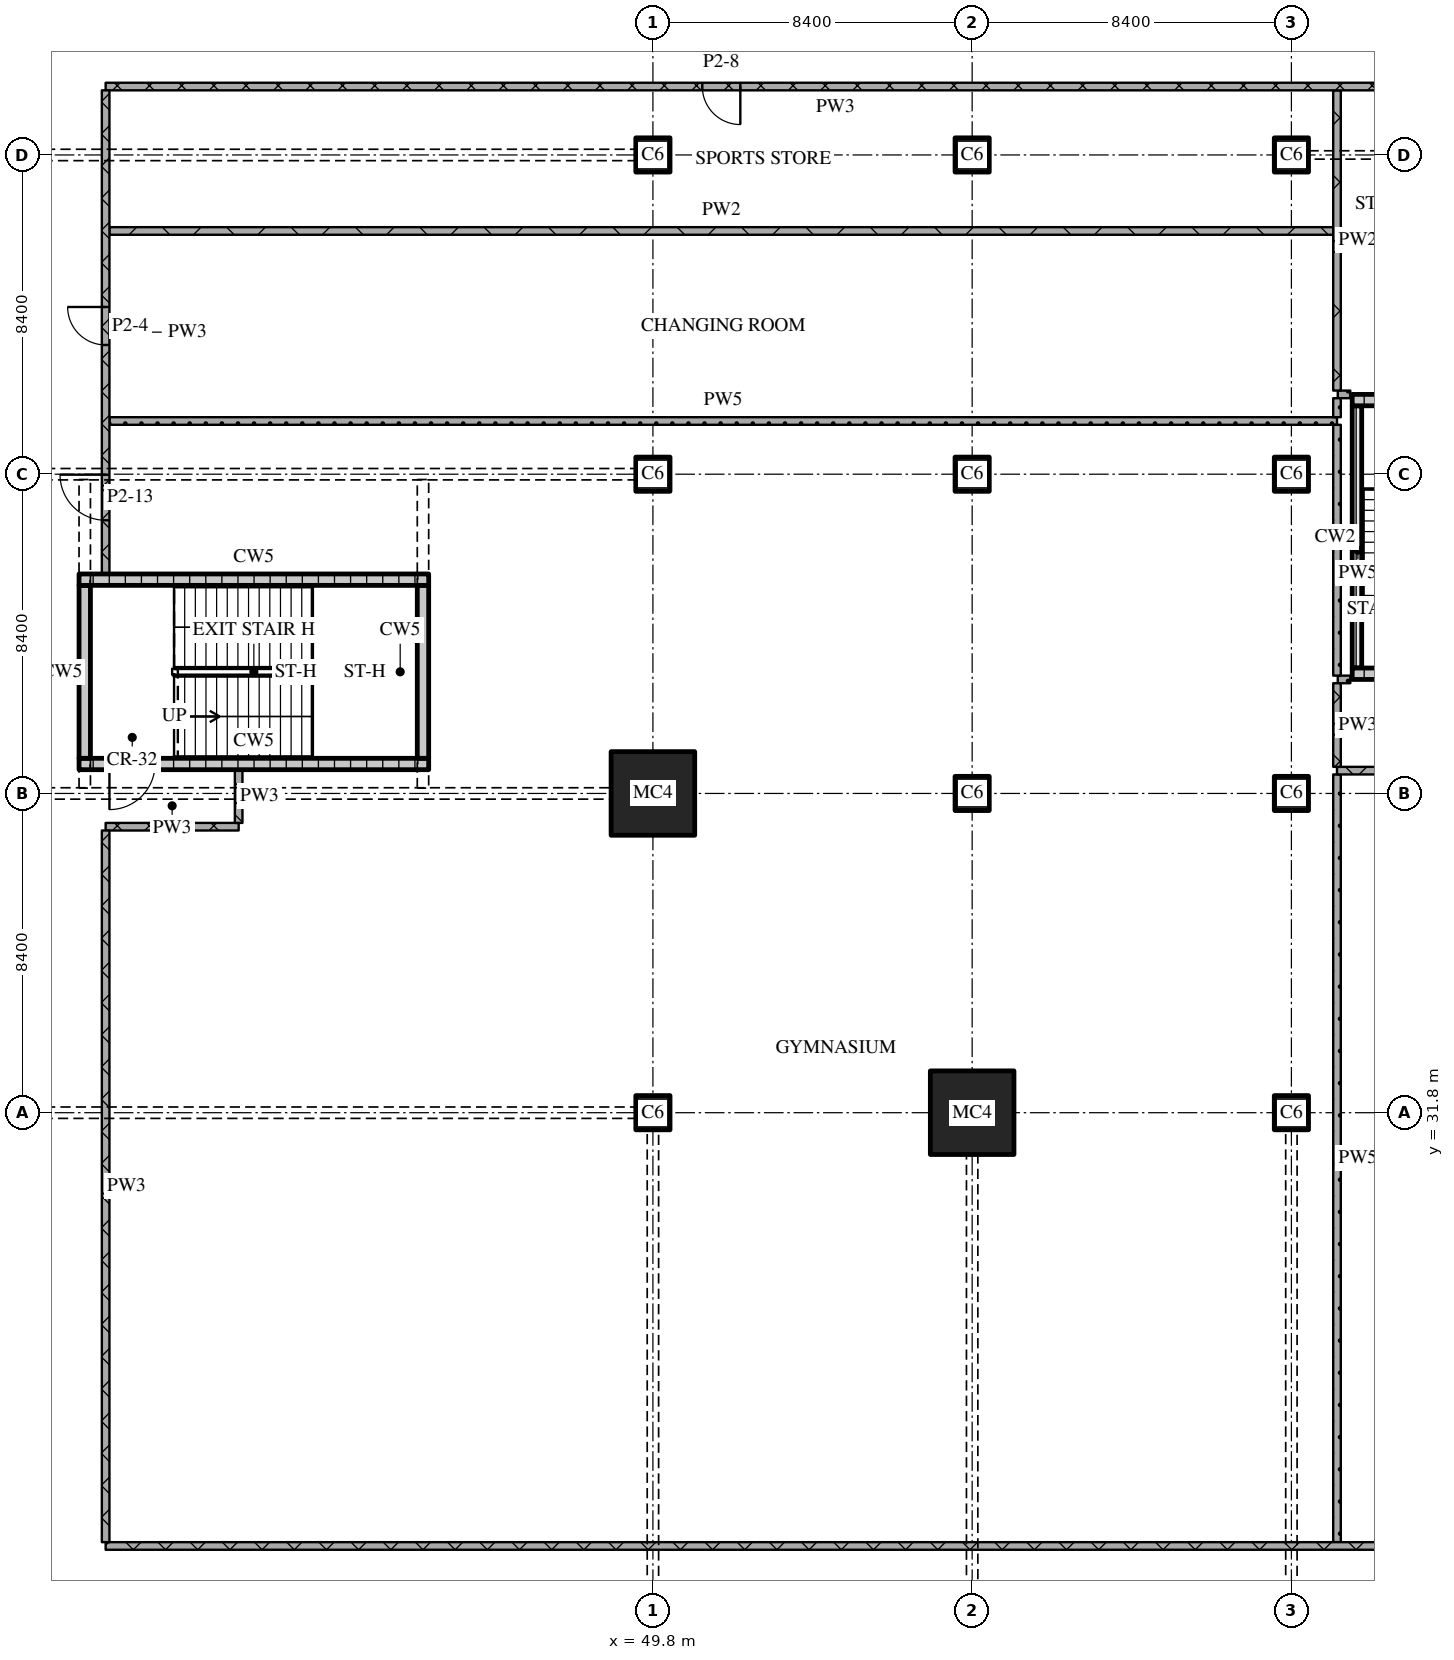
"""IFC4 building model, lengths in metres.
Left out: names, types, materials, properties, quantities, classifications, styles, units other than length and angle.
Written with IfcOpenShell. Run it as: python <this file> out.ifc"""

import sys

from ifc_helpers import new_model, si_unit, direction, frame, frame_2d, origin, origin_2d, place, context, subcontext, project, spatial, rectangle, extrude, element, fill, save


model = new_model("IFC4")
c1 = context("Model", 3, precision=1e-05, world=origin(), true_north=direction((0.0, 1.0)))
c2 = subcontext(c1, "Body", "Model", "MODEL_VIEW")
j1 = project(units=[si_unit("LENGTHUNIT", "METRE"), si_unit("PLANEANGLEUNIT", "RADIAN")], contexts=[c1])
p1 = place(None, origin())
s1 = spatial("IfcSite", under=j1, at=p1, CompositionType="ELEMENT")
p2 = place(p1, origin())
s2 = spatial("IfcBuilding", under=s1, at=p2, CompositionType="ELEMENT")
p3 = place(p2, frame((0.0, 0.0, 14.4)))
s3 = spatial("IfcBuildingStorey", under=s2, at=p3, CompositionType="ELEMENT", Elevation=14.4)
p4 = place(p3, frame((49.8, 31.8, 0.0), z_axis=(0.0, 0.0, 1.0), x_axis=(1.0, 0.0, 0.0)))
e1 = element("IfcColumn", 1, at=p4, inside=s3, PredefinedType="COLUMN", context=c2, shape_type="SweptSolid", body=[
    extrude(rectangle(XDim=0.9, YDim=0.9, at=origin_2d()), origin(), (0.0, 0.0, 1.0), 4.8),
])
p5 = place(p3, frame((49.8, 40.2, 0.0), z_axis=(0.0, 0.0, 1.0), x_axis=(1.0, 0.0, 0.0)))
e2 = element("IfcColumn", 2, at=p5, inside=s3, PredefinedType="COLUMN", context=c2, shape_type="SweptSolid", body=[
    extrude(rectangle(XDim=2.2, YDim=2.2, at=origin_2d()), origin(), (0.0, 0.0, 1.0), 4.8),
])
for number, where, z_axis, x_axis in (
    (3, (49.8, 48.6, 0.0), (0.0, 0.0, 1.0), (1.0, 0.0, 0.0)),
    (4, (49.8, 57.0, 0.0), (0.0, 0.0, 1.0), (1.0, 0.0, 0.0)),
):
    element("IfcColumn", number, at=place(p3, frame(where, z_axis=z_axis, x_axis=x_axis)), inside=s3, PredefinedType="COLUMN", context=c2, shape_type="SweptSolid", body=[
        extrude(rectangle(XDim=0.9, YDim=0.9, at=origin_2d()), origin(), (0.0, 0.0, 1.0), 4.8),
    ])
p6 = place(p3, frame((58.2, 31.8, 0.0), z_axis=(0.0, 0.0, 1.0), x_axis=(1.0, 0.0, 0.0)))
e5 = element("IfcColumn", 5, at=p6, inside=s3, PredefinedType="COLUMN", context=c2, shape_type="SweptSolid", body=[
    extrude(rectangle(XDim=2.2, YDim=2.2, at=origin_2d()), origin(), (0.0, 0.0, 1.0), 4.8),
])
for number, where, z_axis, x_axis in (
    (6, (58.2, 40.2, 0.0), (0.0, 0.0, 1.0), (1.0, 0.0, 0.0)),
    (7, (58.2, 48.6, 0.0), (0.0, 0.0, 1.0), (1.0, 0.0, 0.0)),
    (8, (58.2, 57.0, 0.0), (0.0, 0.0, 1.0), (1.0, 0.0, 0.0)),
    (9, (66.6, 31.8, 0.0), (0.0, 0.0, 1.0), (1.0, 0.0, 0.0)),
    (10, (66.6, 40.2, 0.0), (0.0, 0.0, 1.0), (1.0, 0.0, 0.0)),
    (11, (66.6, 48.6, 0.0), (0.0, 0.0, 1.0), (1.0, 0.0, 0.0)),
    (12, (66.6, 57.0, 0.0), (0.0, 0.0, 1.0), (1.0, 0.0, 0.0)),
):
    element("IfcColumn", number, at=place(p3, frame(where, z_axis=z_axis, x_axis=x_axis)), inside=s3, PredefinedType="COLUMN", context=c2, shape_type="SweptSolid", body=[
        extrude(rectangle(XDim=0.9, YDim=0.9, at=origin_2d()), origin(), (0.0, 0.0, 1.0), 4.8),
    ])
p7 = place(p3, frame((68.2, 43.35, 0.0), z_axis=(0.0, 0.0, 1.0), x_axis=(1.0, 0.0, 0.0)))
e13 = element("IfcWall", 13, at=p7, inside=s3, PredefinedType="SOLIDWALL", context=c2, shape_type="SweptSolid", body=[
    extrude(rectangle(XDim=5.6, YDim=0.3, at=frame_2d((2.8, 0.0))), origin(), (0.0, 0.0, 1.0), 4.5),
])
p8 = place(p7, frame((3.875, 0.0, 0.0)))
e14 = element("IfcOpeningElement", 14, at=p8, cuts=e13, PredefinedType="OPENING", context=c2, shape_type="SweptSolid", body=[
    extrude(rectangle(XDim=1.0, YDim=2.1, at=frame_2d((0.5, 1.05))), frame((0.0, 0.16, 0.0), z_axis=(0.0, -1.0, 0.0), x_axis=(1.0, 0.0, 0.0)), (0.0, 0.0, 1.0), 0.32),
])
p9 = place(p3, frame((68.325, 43.5, 0.0), z_axis=(0.0, 0.0, 1.0), x_axis=(0.0, 1.0, 0.0)))
e15 = element("IfcWall", 15, at=p9, inside=s3, PredefinedType="SOLIDWALL", context=c2, shape_type="SweptSolid", body=[
    extrude(rectangle(XDim=6.9, YDim=0.25, at=frame_2d((3.45, 0.0))), origin(), (0.0, 0.0, 1.0), 4.5),
])
p10 = place(p3, frame((68.2, 50.55, 0.0), z_axis=(0.0, 0.0, 1.0), x_axis=(1.0, 0.0, 0.0)))
e16 = element("IfcWall", 16, at=p10, inside=s3, PredefinedType="SOLIDWALL", context=c2, shape_type="SweptSolid", body=[
    extrude(rectangle(XDim=5.6, YDim=0.3, at=frame_2d((2.8, 0.0))), origin(), (0.0, 0.0, 1.0), 4.5),
])
p11 = place(p3, frame((34.7, 40.975, 0.0), z_axis=(0.0, 0.0, 1.0), x_axis=(1.0, 0.0, 0.0)))
e17 = element("IfcWall", 17, at=p11, inside=s3, PredefinedType="SOLIDWALL", context=c2, shape_type="SweptSolid", body=[
    extrude(rectangle(XDim=9.2, YDim=0.3, at=frame_2d((4.6, 0.0))), origin(), (0.0, 0.0, 1.0), 4.5),
])
p12 = place(p11, frame((0.8, 0.0, 0.0)))
e18 = element("IfcOpeningElement", 18, at=p12, cuts=e17, PredefinedType="OPENING", context=c2, shape_type="SweptSolid", body=[
    extrude(rectangle(XDim=1.2, YDim=2.1, at=frame_2d((0.6, 1.05))), frame((0.0, 0.16, 0.0), z_axis=(0.0, -1.0, 0.0), x_axis=(1.0, 0.0, 0.0)), (0.0, 0.0, 1.0), 0.32),
])
for number, where, z_axis, x_axis in (
    (19, (34.85, 41.125, 0.0), (0.0, 0.0, 1.0), (0.0, 1.0, 0.0)),
    (20, (43.75, 41.125, 0.0), (0.0, 0.0, 1.0), (0.0, 1.0, 0.0)),
):
    element("IfcWall", number, at=place(p3, frame(where, z_axis=z_axis, x_axis=x_axis)), inside=s3, PredefinedType="SOLIDWALL", context=c2, shape_type="SweptSolid", body=[
        extrude(rectangle(XDim=4.55, YDim=0.3, at=frame_2d((2.275, 0.0))), origin(), (0.0, 0.0, 1.0), 4.5),
    ])
p13 = place(p3, frame((34.7, 45.825, 0.0), z_axis=(0.0, 0.0, 1.0), x_axis=(1.0, 0.0, 0.0)))
e21 = element("IfcWall", 21, at=p13, inside=s3, PredefinedType="SOLIDWALL", context=c2, shape_type="SweptSolid", body=[
    extrude(rectangle(XDim=9.2, YDim=0.3, at=frame_2d((4.6, 0.0))), origin(), (0.0, 0.0, 1.0), 4.5),
])
p14 = place(p3, frame((35.4, 20.4, 0.0), z_axis=(0.0, 0.0, 1.0), x_axis=(1.0, 0.0, 0.0)))
e22 = element("IfcWall", 22, at=p14, inside=s3, PredefinedType="PARTITIONING", context=c2, shape_type="SweptSolid", body=[
    extrude(rectangle(XDim=104.4, YDim=0.2, at=frame_2d((52.2, 0.0))), origin(), (0.0, 0.0, 1.0), 4.5),
])
p15 = place(p14, frame((41.9, 0.0, 0.0)))
e23 = element("IfcOpeningElement", 23, at=p15, cuts=e22, PredefinedType="OPENING", context=c2, shape_type="SweptSolid", body=[
    extrude(rectangle(XDim=1.2, YDim=2.1, at=frame_2d((0.6, 1.05))), frame((0.0, 0.11, 0.0), z_axis=(0.0, -1.0, 0.0), x_axis=(1.0, 0.0, 0.0)), (0.0, 0.0, 1.0), 0.22),
])
p16 = place(p14, frame((61.7, 0.0, 0.0)))
e24 = element("IfcOpeningElement", 24, at=p16, cuts=e22, PredefinedType="OPENING", context=c2, shape_type="SweptSolid", body=[
    extrude(rectangle(XDim=1.2, YDim=2.1, at=frame_2d((0.6, 1.05))), frame((0.0, 0.11, 0.0), z_axis=(0.0, -1.0, 0.0), x_axis=(1.0, 0.0, 0.0)), (0.0, 0.0, 1.0), 0.22),
])
p17 = place(p14, frame((87.6, 0.0, 0.0)))
e25 = element("IfcOpeningElement", 25, at=p17, cuts=e22, PredefinedType="OPENING", context=c2, shape_type="SweptSolid", body=[
    extrude(rectangle(XDim=1.2, YDim=2.1, at=frame_2d((0.6, 1.05))), frame((0.0, 0.11, 0.0), z_axis=(0.0, -1.0, 0.0), x_axis=(1.0, 0.0, 0.0)), (0.0, 0.0, 1.0), 0.22),
])
p18 = place(p3, frame((35.4, 39.325, 0.0), z_axis=(0.0, 0.0, 1.0), x_axis=(1.0, 0.0, 0.0)))
e26 = element("IfcWall", 26, at=p18, inside=s3, PredefinedType="PARTITIONING", context=c2, shape_type="SweptSolid", body=[
    extrude(rectangle(XDim=3.5, YDim=0.2, at=frame_2d((1.75, 0.0))), origin(), (0.0, 0.0, 1.0), 4.5),
])
p19 = place(p3, frame((67.8, 40.8, 0.0), z_axis=(0.0, 0.0, 1.0), x_axis=(1.0, 0.0, 0.0)))
e27 = element("IfcWall", 27, at=p19, inside=s3, PredefinedType="PARTITIONING", context=c2, shape_type="SweptSolid", body=[
    extrude(rectangle(XDim=7.2, YDim=0.2, at=frame_2d((3.6, 0.0))), origin(), (0.0, 0.0, 1.0), 4.5),
])
p20 = place(p3, frame((67.82, 43.2, 0.0), z_axis=(0.0, 0.0, 1.0), x_axis=(1.0, 0.0, 0.0)))
e28 = element("IfcWall", 28, at=p20, inside=s3, PredefinedType="PARTITIONING", context=c2, shape_type="SweptSolid", body=[
    extrude(rectangle(XDim=0.33, YDim=0.2, at=frame_2d((0.165, 0.0))), origin(), (0.0, 0.0, 1.0), 4.5),
])
p21 = place(p3, frame((35.5, 50.0, 0.0), z_axis=(0.0, 0.0, 1.0), x_axis=(1.0, 0.0, 0.0)))
e29 = element("IfcWall", 29, at=p21, inside=s3, PredefinedType="PARTITIONING", context=c2, shape_type="SweptSolid", body=[
    extrude(rectangle(XDim=32.3, YDim=0.2, at=frame_2d((16.15, 0.0))), origin(), (0.0, 0.0, 1.0), 4.5),
])
p22 = place(p3, frame((67.82, 50.7, 0.0), z_axis=(0.0, 0.0, 1.0), x_axis=(1.0, 0.0, 0.0)))
e30 = element("IfcWall", 30, at=p22, inside=s3, PredefinedType="PARTITIONING", context=c2, shape_type="SweptSolid", body=[
    extrude(rectangle(XDim=0.33, YDim=0.2, at=frame_2d((0.165, 0.0))), origin(), (0.0, 0.0, 1.0), 4.5),
])
p23 = place(p3, frame((35.5, 55.0, 0.0), z_axis=(0.0, 0.0, 1.0), x_axis=(1.0, 0.0, 0.0)))
e31 = element("IfcWall", 31, at=p23, inside=s3, PredefinedType="PARTITIONING", context=c2, shape_type="SweptSolid", body=[
    extrude(rectangle(XDim=32.2, YDim=0.2, at=frame_2d((16.1, 0.0))), origin(), (0.0, 0.0, 1.0), 4.5),
])
p24 = place(p3, frame((73.8, 58.8, 0.0), z_axis=(0.0, 0.0, 1.0), x_axis=(-1.0, 0.0, 0.0)))
e32 = element("IfcWall", 32, at=p24, inside=s3, PredefinedType="PARTITIONING", context=c2, shape_type="SweptSolid", body=[
    extrude(rectangle(XDim=38.4, YDim=0.2, at=frame_2d((19.2, 0.0))), origin(), (0.0, 0.0, 1.0), 4.5),
])
p25 = place(p24, frame((21.7, 0.0, 0.0)))
e33 = element("IfcOpeningElement", 33, at=p25, cuts=e32, PredefinedType="OPENING", context=c2, shape_type="SweptSolid", body=[
    extrude(rectangle(XDim=1.0, YDim=2.1, at=frame_2d((0.5, 1.05))), frame((0.0, 0.11, 0.0), z_axis=(0.0, -1.0, 0.0), x_axis=(1.0, 0.0, 0.0)), (0.0, 0.0, 1.0), 0.22),
])
p26 = place(p3, frame((35.4, 39.225, 0.0), z_axis=(0.0, 0.0, 1.0), x_axis=(0.0, -1.0, 0.0)))
e34 = element("IfcWall", 34, at=p26, inside=s3, PredefinedType="PARTITIONING", context=c2, shape_type="SweptSolid", body=[
    extrude(rectangle(XDim=18.725, YDim=0.2, at=frame_2d((9.363, 0.0))), origin(), (0.0, 0.0, 1.0), 4.5),
])
p27 = place(p3, frame((35.4, 58.7, 0.0), z_axis=(0.0, 0.0, 1.0), x_axis=(0.0, -1.0, 0.0)))
e35 = element("IfcWall", 35, at=p27, inside=s3, PredefinedType="PARTITIONING", context=c2, shape_type="SweptSolid", body=[
    extrude(rectangle(XDim=12.725, YDim=0.2, at=frame_2d((6.362, 0.0))), origin(), (0.0, 0.0, 1.0), 4.5),
])
p28 = place(p27, frame((5.7, 0.0, 0.0)))
e36 = element("IfcOpeningElement", 36, at=p28, cuts=e35, PredefinedType="OPENING", context=c2, shape_type="SweptSolid", body=[
    extrude(rectangle(XDim=1.0, YDim=2.1, at=frame_2d((0.5, 1.05))), frame((0.0, 0.11, 0.0), z_axis=(0.0, -1.0, 0.0), x_axis=(1.0, 0.0, 0.0)), (0.0, 0.0, 1.0), 0.22),
])
p29 = place(p27, frame((10.113, 0.0, 0.0)))
e37 = element("IfcOpeningElement", 37, at=p29, cuts=e35, PredefinedType="OPENING", context=c2, shape_type="SweptSolid", body=[
    extrude(rectangle(XDim=1.2, YDim=2.1, at=frame_2d((0.6, 1.05))), frame((0.0, 0.11, 0.0), z_axis=(0.0, -1.0, 0.0), x_axis=(1.0, 0.0, 0.0)), (0.0, 0.0, 1.0), 0.22),
])
p30 = place(p3, frame((38.9, 40.825, 0.0), z_axis=(0.0, 0.0, 1.0), x_axis=(0.0, -1.0, 0.0)))
e38 = element("IfcWall", 38, at=p30, inside=s3, PredefinedType="PARTITIONING", context=c2, shape_type="SweptSolid", body=[
    extrude(rectangle(XDim=1.4, YDim=0.2, at=frame_2d((0.7, 0.0))), origin(), (0.0, 0.0, 1.0), 4.5),
])
p31 = place(p3, frame((67.8, 43.1, 0.0), z_axis=(0.0, 0.0, 1.0), x_axis=(0.0, -1.0, 0.0)))
e39 = element("IfcWall", 39, at=p31, inside=s3, PredefinedType="PARTITIONING", context=c2, shape_type="SweptSolid", body=[
    extrude(rectangle(XDim=2.2, YDim=0.2, at=frame_2d((1.1, 0.0))), origin(), (0.0, 0.0, 1.0), 4.5),
])
p32 = place(p3, frame((67.8, 58.7, 0.0), z_axis=(0.0, 0.0, 1.0), x_axis=(0.0, -1.0, 0.0)))
e40 = element("IfcWall", 40, at=p32, inside=s3, PredefinedType="PARTITIONING", context=c2, shape_type="SweptSolid", body=[
    extrude(rectangle(XDim=7.9, YDim=0.2, at=frame_2d((3.95, 0.0))), origin(), (0.0, 0.0, 1.0), 4.5),
])
p33 = place(p3, frame((67.8, 49.9, 0.0), z_axis=(0.0, 0.0, 1.0), x_axis=(0.0, -1.0, 0.0)))
e41 = element("IfcWall", 41, at=p33, inside=s3, PredefinedType="PARTITIONING", context=c2, shape_type="SweptSolid", body=[
    extrude(rectangle(XDim=6.6, YDim=0.2, at=frame_2d((3.3, 0.0))), origin(), (0.0, 0.0, 1.0), 4.5),
])
p34 = place(p3, frame((67.8, 50.6, 0.0), z_axis=(0.0, 0.0, 1.0), x_axis=(0.0, -1.0, 0.0)))
e42 = element("IfcWall", 42, at=p34, inside=s3, PredefinedType="PARTITIONING", context=c2, shape_type="SweptSolid", body=[
    extrude(rectangle(XDim=0.5, YDim=0.2, at=frame_2d((0.25, 0.0))), origin(), (0.0, 0.0, 1.0), 4.5),
])
p35 = place(p3, frame((67.8, 40.7, 0.0), z_axis=(0.0, 0.0, 1.0), x_axis=(0.0, -1.0, 0.0)))
e43 = element("IfcWall", 43, at=p35, inside=s3, PredefinedType="PARTITIONING", context=c2, shape_type="SweptSolid", body=[
    extrude(rectangle(XDim=20.2, YDim=0.2, at=frame_2d((10.1, 0.0))), origin(), (0.0, 0.0, 1.0), 4.5),
])
p36 = place(p12, origin())
e44 = element("IfcDoor", 44, at=p36, inside=s3, OperationType="SINGLE_SWING_RIGHT", PredefinedType="DOOR", context=c2, shape_type="SweptSolid", body=[
    extrude(rectangle(XDim=1.2, YDim=2.1, at=frame_2d((0.6, 1.05))), frame((0.0, 0.025, 0.0), z_axis=(0.0, -1.0, 0.0), x_axis=(1.0, 0.0, 0.0)), (0.0, 0.0, 1.0), 0.05),
])
fill(e18, e44)
p37 = place(p25, origin())
e45 = element("IfcDoor", 45, at=p37, inside=s3, OperationType="SINGLE_SWING_LEFT", PredefinedType="DOOR", context=c2, shape_type="SweptSolid", body=[
    extrude(rectangle(XDim=1.0, YDim=2.1, at=frame_2d((0.5, 1.05))), frame((0.0, 0.025, 0.0), z_axis=(0.0, -1.0, 0.0), x_axis=(1.0, 0.0, 0.0)), (0.0, 0.0, 1.0), 0.05),
])
fill(e33, e45)
p38 = place(p28, origin())
e46 = element("IfcDoor", 46, at=p38, inside=s3, OperationType="SINGLE_SWING_RIGHT", PredefinedType="DOOR", context=c2, shape_type="SweptSolid", body=[
    extrude(rectangle(XDim=1.0, YDim=2.1, at=frame_2d((0.5, 1.05))), frame((0.0, 0.025, 0.0), z_axis=(0.0, -1.0, 0.0), x_axis=(1.0, 0.0, 0.0)), (0.0, 0.0, 1.0), 0.05),
])
fill(e36, e46)
p39 = place(p29, origin())
e47 = element("IfcDoor", 47, at=p39, inside=s3, OperationType="SINGLE_SWING_RIGHT", PredefinedType="DOOR", context=c2, shape_type="SweptSolid", body=[
    extrude(rectangle(XDim=1.2, YDim=2.1, at=frame_2d((0.6, 1.05))), frame((0.0, 0.025, 0.0), z_axis=(0.0, -1.0, 0.0), x_axis=(1.0, 0.0, 0.0)), (0.0, 0.0, 1.0), 0.05),
])
fill(e37, e47)
save(model, sys.argv[1])
